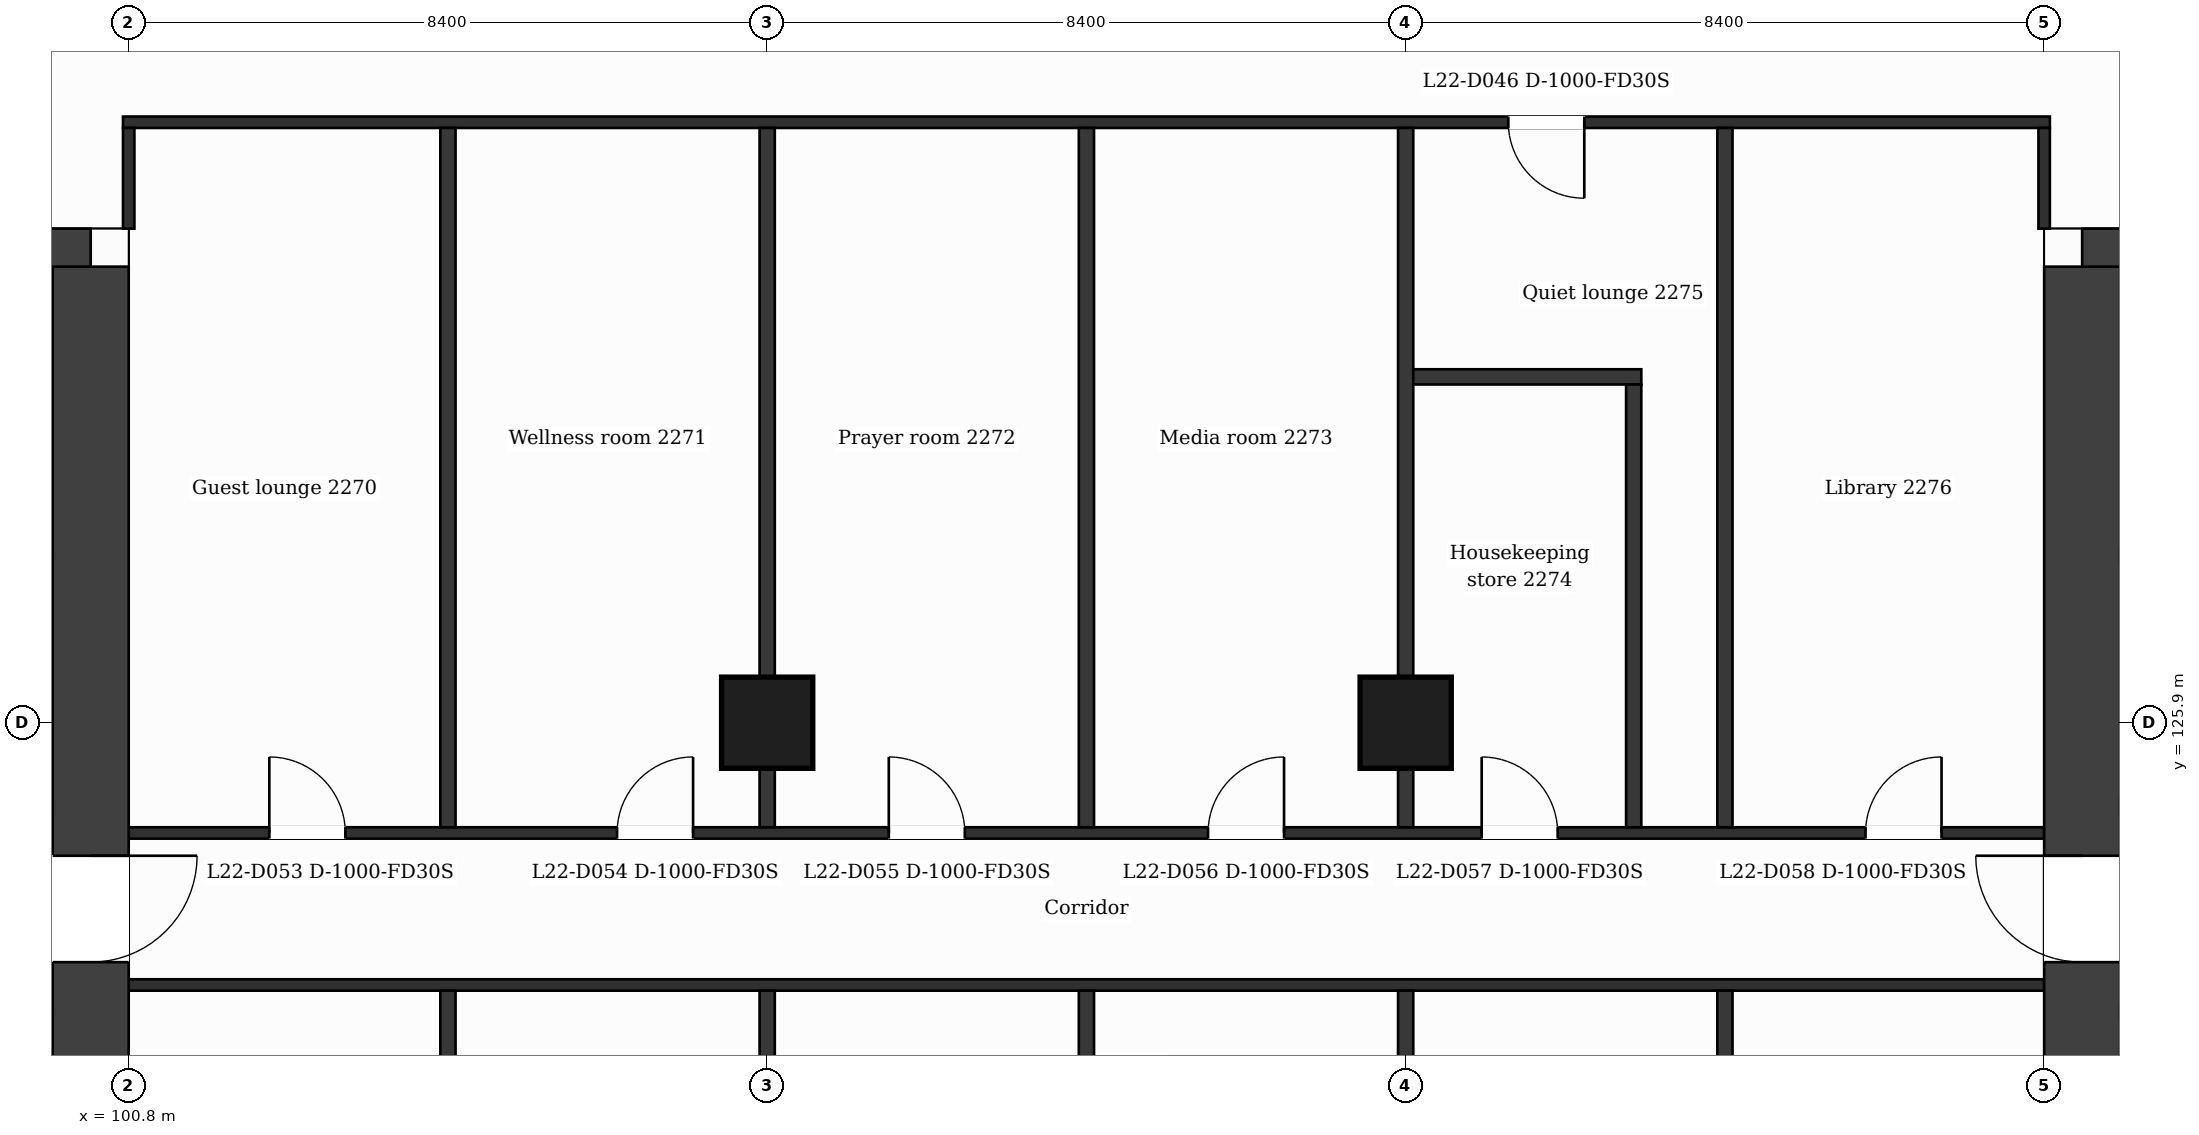
"""IFC4 building model, lengths in metres.
Left out: names, types, materials, properties, quantities, classifications, styles, units other than length and angle.
Written with IfcOpenShell. Run it as: python <this file> out.ifc"""

import sys

from ifc_helpers import new_model, si_unit, direction, frame, frame_2d, origin, origin_2d, place, context, subcontext, project, spatial, rectangle, extrude, element, fill, save


model = new_model("IFC4")
c1 = context("Model", 3, precision=1e-05, world=origin(), true_north=direction((0.0, 1.0)))
c2 = subcontext(c1, "Body", "Model", "MODEL_VIEW")
j1 = project(units=[si_unit("LENGTHUNIT", "METRE"), si_unit("PLANEANGLEUNIT", "RADIAN")], contexts=[c1])
p1 = place(None, origin())
s1 = spatial("IfcSite", under=j1, at=p1, CompositionType="ELEMENT")
p2 = place(p1, origin())
s2 = spatial("IfcBuilding", under=s1, at=p2, CompositionType="ELEMENT")
p3 = place(p2, frame((0.0, 0.0, 98.4)))
s3 = spatial("IfcBuildingStorey", under=s2, at=p3, CompositionType="ELEMENT", Elevation=98.4)
p4 = place(p3, frame((89.068, 131.9, 0.0), z_axis=(0.0, 0.0, 1.0), x_axis=(1.0, 0.0, 0.0)))
e1 = element("IfcWall", 1, at=p4, inside=s3, PredefinedType="SHEAR", context=c2, shape_type="SweptSolid", body=[
    extrude(rectangle(XDim=11.232, YDim=1.0, at=frame_2d((5.616, 0.0))), origin(), (0.0, 0.0, 1.0), 3.7),
])
p5 = place(p4, frame((6.646, 0.0, 0.0)))
e2 = element("IfcOpeningElement", 2, at=p5, cuts=e1, PredefinedType="OPENING", context=c2, shape_type="SweptSolid", body=[
    extrude(rectangle(XDim=1.2, YDim=2.1, at=frame_2d((0.6, 1.05))), frame((0.0, 0.51, 0.0), z_axis=(0.0, -1.0, 0.0), x_axis=(1.0, 0.0, 0.0)), (0.0, 0.0, 1.0), 1.02),
])
p6 = place(p3, frame((100.3, 131.9, 0.0), z_axis=(0.0, 0.0, 1.0), x_axis=(0.0, -1.0, 0.0)))
e3 = element("IfcWall", 3, at=p6, inside=s3, PredefinedType="SHEAR", context=c2, shape_type="SweptSolid", body=[
    extrude(rectangle(XDim=21.0, YDim=1.0, at=frame_2d((10.5, 0.0))), origin(), (0.0, 0.0, 1.0), 3.7),
])
p7 = place(p6, frame((7.75, 0.0, 0.0)))
e4 = element("IfcOpeningElement", 4, at=p7, cuts=e3, PredefinedType="OPENING", context=c2, shape_type="SweptSolid", body=[
    extrude(rectangle(XDim=1.4, YDim=2.1, at=frame_2d((0.7, 1.05))), frame((0.0, 0.51, 0.0), z_axis=(0.0, -1.0, 0.0), x_axis=(1.0, 0.0, 0.0)), (0.0, 0.0, 1.0), 1.02),
])
p8 = place(p3, frame((126.5, 131.9, 0.0), z_axis=(0.0, 0.0, 1.0), x_axis=(1.0, 0.0, 0.0)))
e5 = element("IfcWall", 5, at=p8, inside=s3, PredefinedType="SHEAR", context=c2, shape_type="SweptSolid", body=[
    extrude(rectangle(XDim=11.232, YDim=1.0, at=frame_2d((5.616, 0.0))), origin(), (0.0, 0.0, 1.0), 3.7),
])
p9 = place(p8, frame((3.386, 0.0, 0.0)))
e6 = element("IfcOpeningElement", 6, at=p9, cuts=e5, PredefinedType="OPENING", context=c2, shape_type="SweptSolid", body=[
    extrude(rectangle(XDim=1.2, YDim=2.1, at=frame_2d((0.6, 1.05))), frame((0.0, 0.51, 0.0), z_axis=(0.0, -1.0, 0.0), x_axis=(1.0, 0.0, 0.0)), (0.0, 0.0, 1.0), 1.02),
])
p10 = place(p3, frame((126.5, 110.9, 0.0), z_axis=(0.0, 0.0, 1.0), x_axis=(0.0, 1.0, 0.0)))
e7 = element("IfcWall", 7, at=p10, inside=s3, PredefinedType="SHEAR", context=c2, shape_type="SweptSolid", body=[
    extrude(rectangle(XDim=21.0, YDim=1.0, at=frame_2d((10.5, 0.0))), origin(), (0.0, 0.0, 1.0), 3.7),
])
p11 = place(p10, frame((11.85, 0.0, 0.0)))
e8 = element("IfcOpeningElement", 8, at=p11, cuts=e7, PredefinedType="OPENING", context=c2, shape_type="SweptSolid", body=[
    extrude(rectangle(XDim=1.4, YDim=2.1, at=frame_2d((0.7, 1.05))), frame((0.0, 0.51, 0.0), z_axis=(0.0, -1.0, 0.0), x_axis=(1.0, 0.0, 0.0)), (0.0, 0.0, 1.0), 1.02),
])
for number, where, z_axis, x_axis in (
    (9, (109.2, 125.9, 0.0), (0.0, 0.0, 1.0), (1.0, 0.0, 0.0)),
    (10, (117.6, 125.9, 0.0), (0.0, 0.0, 1.0), (1.0, 0.0, 0.0)),
):
    element("IfcColumn", number, at=place(p3, frame(where, z_axis=z_axis, x_axis=x_axis)), inside=s3, PredefinedType="COLUMN", context=c2, shape_type="SweptSolid", body=[
        extrude(rectangle(XDim=1.2, YDim=1.2, at=origin_2d()), origin(), (0.0, 0.0, 1.0), 3.7),
    ])
p12 = place(p3, frame((95.227, 122.1, 0.0), z_axis=(0.0, 0.0, 1.0), x_axis=(1.0, 0.0, 0.0)))
e11 = element("IfcWall", 11, at=p12, inside=s3, PredefinedType="PARTITIONING", context=c2, shape_type="SweptSolid", body=[
    extrude(rectangle(XDim=4.573, YDim=0.2, at=frame_2d((2.287, 0.0))), origin(), (0.0, 0.0, 1.0), 3.38),
])
p13 = place(p12, frame((0.693, 0.0, 0.0)))
e12 = element("IfcOpeningElement", 12, at=p13, cuts=e11, PredefinedType="OPENING", context=c2, shape_type="SweptSolid", body=[
    extrude(rectangle(XDim=0.9, YDim=2.1, at=frame_2d((0.45, 1.05))), frame((0.0, 0.11, 0.0), z_axis=(0.0, -1.0, 0.0), x_axis=(1.0, 0.0, 0.0)), (0.0, 0.0, 1.0), 0.22),
])
p14 = place(p12, frame((2.98, 0.0, 0.0)))
e13 = element("IfcOpeningElement", 13, at=p14, cuts=e11, PredefinedType="OPENING", context=c2, shape_type="SweptSolid", body=[
    extrude(rectangle(XDim=0.9, YDim=2.1, at=frame_2d((0.45, 1.05))), frame((0.0, 0.11, 0.0), z_axis=(0.0, -1.0, 0.0), x_axis=(1.0, 0.0, 0.0)), (0.0, 0.0, 1.0), 0.22),
])
p15 = place(p3, frame((100.8, 122.45, 0.0), z_axis=(0.0, 0.0, 1.0), x_axis=(1.0, 0.0, 0.0)))
e14 = element("IfcWall", 14, at=p15, inside=s3, PredefinedType="PARTITIONING", context=c2, shape_type="SweptSolid", body=[
    extrude(rectangle(XDim=25.2, YDim=0.15, at=frame_2d((12.6, 0.0))), origin(), (0.0, 0.0, 1.0), 3.38),
])
p16 = place(p3, frame((100.8, 124.45, 0.0), z_axis=(0.0, 0.0, 1.0), x_axis=(1.0, 0.0, 0.0)))
e15 = element("IfcWall", 15, at=p16, inside=s3, PredefinedType="PARTITIONING", context=c2, shape_type="SweptSolid", body=[
    extrude(rectangle(XDim=25.2, YDim=0.15, at=frame_2d((12.6, 0.0))), origin(), (0.0, 0.0, 1.0), 3.38),
])
p17 = place(p16, frame((1.85, 0.0, 0.0)))
e16 = element("IfcOpeningElement", 16, at=p17, cuts=e15, PredefinedType="OPENING", context=c2, shape_type="SweptSolid", body=[
    extrude(rectangle(XDim=1.0, YDim=2.1, at=frame_2d((0.5, 1.05))), frame((0.0, 0.085, 0.0), z_axis=(0.0, -1.0, 0.0), x_axis=(1.0, 0.0, 0.0)), (0.0, 0.0, 1.0), 0.17),
])
p18 = place(p16, frame((6.425, 0.0, 0.0)))
e17 = element("IfcOpeningElement", 17, at=p18, cuts=e15, PredefinedType="OPENING", context=c2, shape_type="SweptSolid", body=[
    extrude(rectangle(XDim=1.0, YDim=2.1, at=frame_2d((0.5, 1.05))), frame((0.0, 0.085, 0.0), z_axis=(0.0, -1.0, 0.0), x_axis=(1.0, 0.0, 0.0)), (0.0, 0.0, 1.0), 0.17),
])
p19 = place(p16, frame((10.0, 0.0, 0.0)))
e18 = element("IfcOpeningElement", 18, at=p19, cuts=e15, PredefinedType="OPENING", context=c2, shape_type="SweptSolid", body=[
    extrude(rectangle(XDim=1.0, YDim=2.1, at=frame_2d((0.5, 1.05))), frame((0.0, 0.085, 0.0), z_axis=(0.0, -1.0, 0.0), x_axis=(1.0, 0.0, 0.0)), (0.0, 0.0, 1.0), 0.17),
])
p20 = place(p16, frame((14.2, 0.0, 0.0)))
e19 = element("IfcOpeningElement", 19, at=p20, cuts=e15, PredefinedType="OPENING", context=c2, shape_type="SweptSolid", body=[
    extrude(rectangle(XDim=1.0, YDim=2.1, at=frame_2d((0.5, 1.05))), frame((0.0, 0.085, 0.0), z_axis=(0.0, -1.0, 0.0), x_axis=(1.0, 0.0, 0.0)), (0.0, 0.0, 1.0), 0.17),
])
p21 = place(p16, frame((17.8, 0.0, 0.0)))
e20 = element("IfcOpeningElement", 20, at=p21, cuts=e15, PredefinedType="OPENING", context=c2, shape_type="SweptSolid", body=[
    extrude(rectangle(XDim=1.0, YDim=2.1, at=frame_2d((0.5, 1.05))), frame((0.0, 0.085, 0.0), z_axis=(0.0, -1.0, 0.0), x_axis=(1.0, 0.0, 0.0)), (0.0, 0.0, 1.0), 0.17),
])
p22 = place(p16, frame((22.85, 0.0, 0.0)))
e21 = element("IfcOpeningElement", 21, at=p22, cuts=e15, PredefinedType="OPENING", context=c2, shape_type="SweptSolid", body=[
    extrude(rectangle(XDim=1.0, YDim=2.1, at=frame_2d((0.5, 1.05))), frame((0.0, 0.085, 0.0), z_axis=(0.0, -1.0, 0.0), x_axis=(1.0, 0.0, 0.0)), (0.0, 0.0, 1.0), 0.17),
])
p23 = place(p3, frame((127.0, 124.8, 0.0), z_axis=(0.0, 0.0, 1.0), x_axis=(1.0, 0.0, 0.0)))
e22 = element("IfcWall", 22, at=p23, inside=s3, PredefinedType="PARTITIONING", context=c2, shape_type="SweptSolid", body=[
    extrude(rectangle(XDim=4.649, YDim=0.2, at=frame_2d((2.324, 0.0))), origin(), (0.0, 0.0, 1.0), 3.38),
])
p24 = place(p23, frame((0.743, 0.0, 0.0)))
e23 = element("IfcOpeningElement", 23, at=p24, cuts=e22, PredefinedType="OPENING", context=c2, shape_type="SweptSolid", body=[
    extrude(rectangle(XDim=1.1, YDim=2.1, at=frame_2d((0.55, 1.05))), frame((0.0, 0.11, 0.0), z_axis=(0.0, -1.0, 0.0), x_axis=(1.0, 0.0, 0.0)), (0.0, 0.0, 1.0), 0.22),
])
p25 = place(p3, frame((127.0, 128.1, 0.0), z_axis=(0.0, 0.0, 1.0), x_axis=(1.0, 0.0, 0.0)))
e24 = element("IfcWall", 24, at=p25, inside=s3, PredefinedType="PARTITIONING", context=c2, shape_type="SweptSolid", body=[
    extrude(rectangle(XDim=4.649, YDim=0.2, at=frame_2d((2.324, 0.0))), origin(), (0.0, 0.0, 1.0), 3.38),
])
p26 = place(p25, frame((2.805, 0.0, 0.0)))
e25 = element("IfcOpeningElement", 25, at=p26, cuts=e24, PredefinedType="OPENING", context=c2, shape_type="SweptSolid", body=[
    extrude(rectangle(XDim=1.1, YDim=2.1, at=frame_2d((0.55, 1.05))), frame((0.0, 0.11, 0.0), z_axis=(0.0, -1.0, 0.0), x_axis=(1.0, 0.0, 0.0)), (0.0, 0.0, 1.0), 0.22),
])
p27 = place(p3, frame((117.6, 130.45, 0.0), z_axis=(0.0, 0.0, 1.0), x_axis=(1.0, 0.0, 0.0)))
e26 = element("IfcWall", 26, at=p27, inside=s3, PredefinedType="PARTITIONING", context=c2, shape_type="SweptSolid", body=[
    extrude(rectangle(XDim=3.1, YDim=0.2, at=frame_2d((1.55, 0.0))), origin(), (0.0, 0.0, 1.0), 3.38),
])
p28 = place(p3, frame((100.725, 133.8, 0.0), z_axis=(0.0, 0.0, 1.0), x_axis=(1.0, 0.0, 0.0)))
e27 = element("IfcWall", 27, at=p28, inside=s3, PredefinedType="PARTITIONING", context=c2, shape_type="SweptSolid", body=[
    extrude(rectangle(XDim=25.35, YDim=0.15, at=frame_2d((12.675, 0.0))), origin(), (0.0, 0.0, 1.0), 3.38),
])
p29 = place(p28, frame((18.225, 0.0, 0.0)))
e28 = element("IfcOpeningElement", 28, at=p29, cuts=e27, PredefinedType="OPENING", context=c2, shape_type="SweptSolid", body=[
    extrude(rectangle(XDim=1.0, YDim=2.1, at=frame_2d((0.5, 1.05))), frame((0.0, 0.085, 0.0), z_axis=(0.0, -1.0, 0.0), x_axis=(1.0, 0.0, 0.0)), (0.0, 0.0, 1.0), 0.17),
])
p30 = place(p3, frame((100.8, 132.4, 0.0), z_axis=(0.0, 0.0, 1.0), x_axis=(0.0, 1.0, 0.0)))
e29 = element("IfcWall", 29, at=p30, inside=s3, PredefinedType="PARTITIONING", context=c2, shape_type="SweptSolid", body=[
    extrude(rectangle(XDim=1.325, YDim=0.15, at=frame_2d((0.663, 0.0))), origin(), (0.0, 0.0, 1.0), 3.38),
])
p31 = place(p3, frame((105.0, 109.075, 0.0), z_axis=(0.0, 0.0, 1.0), x_axis=(0.0, 1.0, 0.0)))
e30 = element("IfcWall", 30, at=p31, inside=s3, PredefinedType="PARTITIONING", context=c2, shape_type="SweptSolid", body=[
    extrude(rectangle(XDim=13.3, YDim=0.2, at=frame_2d((6.65, 0.0))), origin(), (0.0, 0.0, 1.0), 3.38),
])
p32 = place(p3, frame((105.0, 124.525, 0.0), z_axis=(0.0, 0.0, 1.0), x_axis=(0.0, 1.0, 0.0)))
e31 = element("IfcWall", 31, at=p32, inside=s3, PredefinedType="PARTITIONING", context=c2, shape_type="SweptSolid", body=[
    extrude(rectangle(XDim=9.2, YDim=0.2, at=frame_2d((4.6, 0.0))), origin(), (0.0, 0.0, 1.0), 3.38),
])
p33 = place(p3, frame((109.2, 109.075, 0.0), z_axis=(0.0, 0.0, 1.0), x_axis=(0.0, 1.0, 0.0)))
e32 = element("IfcWall", 32, at=p33, inside=s3, PredefinedType="PARTITIONING", context=c2, shape_type="SweptSolid", body=[
    extrude(rectangle(XDim=13.3, YDim=0.2, at=frame_2d((6.65, 0.0))), origin(), (0.0, 0.0, 1.0), 3.38),
])
p34 = place(p3, frame((109.2, 124.525, 0.0), z_axis=(0.0, 0.0, 1.0), x_axis=(0.0, 1.0, 0.0)))
e33 = element("IfcWall", 33, at=p34, inside=s3, PredefinedType="PARTITIONING", context=c2, shape_type="SweptSolid", body=[
    extrude(rectangle(XDim=9.2, YDim=0.2, at=frame_2d((4.6, 0.0))), origin(), (0.0, 0.0, 1.0), 3.38),
])
p35 = place(p3, frame((113.4, 109.075, 0.0), z_axis=(0.0, 0.0, 1.0), x_axis=(0.0, 1.0, 0.0)))
e34 = element("IfcWall", 34, at=p35, inside=s3, PredefinedType="PARTITIONING", context=c2, shape_type="SweptSolid", body=[
    extrude(rectangle(XDim=13.3, YDim=0.2, at=frame_2d((6.65, 0.0))), origin(), (0.0, 0.0, 1.0), 3.38),
])
p36 = place(p3, frame((113.4, 124.525, 0.0), z_axis=(0.0, 0.0, 1.0), x_axis=(0.0, 1.0, 0.0)))
e35 = element("IfcWall", 35, at=p36, inside=s3, PredefinedType="PARTITIONING", context=c2, shape_type="SweptSolid", body=[
    extrude(rectangle(XDim=9.2, YDim=0.2, at=frame_2d((4.6, 0.0))), origin(), (0.0, 0.0, 1.0), 3.38),
])
p37 = place(p3, frame((117.6, 109.075, 0.0), z_axis=(0.0, 0.0, 1.0), x_axis=(0.0, 1.0, 0.0)))
e36 = element("IfcWall", 36, at=p37, inside=s3, PredefinedType="PARTITIONING", context=c2, shape_type="SweptSolid", body=[
    extrude(rectangle(XDim=13.3, YDim=0.2, at=frame_2d((6.65, 0.0))), origin(), (0.0, 0.0, 1.0), 3.38),
])
p38 = place(p3, frame((117.6, 124.525, 0.0), z_axis=(0.0, 0.0, 1.0), x_axis=(0.0, 1.0, 0.0)))
e37 = element("IfcWall", 37, at=p38, inside=s3, PredefinedType="PARTITIONING", context=c2, shape_type="SweptSolid", body=[
    extrude(rectangle(XDim=9.2, YDim=0.2, at=frame_2d((4.6, 0.0))), origin(), (0.0, 0.0, 1.0), 3.38),
])
p39 = place(p3, frame((120.6, 124.525, 0.0), z_axis=(0.0, 0.0, 1.0), x_axis=(0.0, 1.0, 0.0)))
e38 = element("IfcWall", 38, at=p39, inside=s3, PredefinedType="PARTITIONING", context=c2, shape_type="SweptSolid", body=[
    extrude(rectangle(XDim=5.825, YDim=0.2, at=frame_2d((2.913, 0.0))), origin(), (0.0, 0.0, 1.0), 3.38),
])
p40 = place(p3, frame((121.8, 109.075, 0.0), z_axis=(0.0, 0.0, 1.0), x_axis=(0.0, 1.0, 0.0)))
e39 = element("IfcWall", 39, at=p40, inside=s3, PredefinedType="PARTITIONING", context=c2, shape_type="SweptSolid", body=[
    extrude(rectangle(XDim=13.3, YDim=0.2, at=frame_2d((6.65, 0.0))), origin(), (0.0, 0.0, 1.0), 3.38),
])
p41 = place(p3, frame((121.8, 124.525, 0.0), z_axis=(0.0, 0.0, 1.0), x_axis=(0.0, 1.0, 0.0)))
e40 = element("IfcWall", 40, at=p41, inside=s3, PredefinedType="PARTITIONING", context=c2, shape_type="SweptSolid", body=[
    extrude(rectangle(XDim=9.2, YDim=0.2, at=frame_2d((4.6, 0.0))), origin(), (0.0, 0.0, 1.0), 3.38),
])
p42 = place(p3, frame((126.0, 132.4, 0.0), z_axis=(0.0, 0.0, 1.0), x_axis=(0.0, 1.0, 0.0)))
e41 = element("IfcWall", 41, at=p42, inside=s3, PredefinedType="PARTITIONING", context=c2, shape_type="SweptSolid", body=[
    extrude(rectangle(XDim=1.325, YDim=0.15, at=frame_2d((0.663, 0.0))), origin(), (0.0, 0.0, 1.0), 3.38),
])
p43 = place(p29, origin())
e42 = element("IfcDoor", 42, at=p43, inside=s3, OperationType="SINGLE_SWING_RIGHT", PredefinedType="DOOR", context=c2, shape_type="SweptSolid", body=[
    extrude(rectangle(XDim=1.0, YDim=2.1, at=frame_2d((0.5, 1.05))), frame((0.0, 0.025, 0.0), z_axis=(0.0, -1.0, 0.0), x_axis=(1.0, 0.0, 0.0)), (0.0, 0.0, 1.0), 0.05),
])
fill(e28, e42)
p44 = place(p17, origin())
e43 = element("IfcDoor", 43, at=p44, inside=s3, OperationType="SINGLE_SWING_LEFT", PredefinedType="DOOR", context=c2, shape_type="SweptSolid", body=[
    extrude(rectangle(XDim=1.0, YDim=2.1, at=frame_2d((0.5, 1.05))), frame((0.0, 0.025, 0.0), z_axis=(0.0, -1.0, 0.0), x_axis=(1.0, 0.0, 0.0)), (0.0, 0.0, 1.0), 0.05),
])
fill(e16, e43)
p45 = place(p18, origin())
e44 = element("IfcDoor", 44, at=p45, inside=s3, OperationType="SINGLE_SWING_RIGHT", PredefinedType="DOOR", context=c2, shape_type="SweptSolid", body=[
    extrude(rectangle(XDim=1.0, YDim=2.1, at=frame_2d((0.5, 1.05))), frame((0.0, 0.025, 0.0), z_axis=(0.0, -1.0, 0.0), x_axis=(1.0, 0.0, 0.0)), (0.0, 0.0, 1.0), 0.05),
])
fill(e17, e44)
p46 = place(p19, origin())
e45 = element("IfcDoor", 45, at=p46, inside=s3, OperationType="SINGLE_SWING_LEFT", PredefinedType="DOOR", context=c2, shape_type="SweptSolid", body=[
    extrude(rectangle(XDim=1.0, YDim=2.1, at=frame_2d((0.5, 1.05))), frame((0.0, 0.025, 0.0), z_axis=(0.0, -1.0, 0.0), x_axis=(1.0, 0.0, 0.0)), (0.0, 0.0, 1.0), 0.05),
])
fill(e18, e45)
p47 = place(p20, origin())
e46 = element("IfcDoor", 46, at=p47, inside=s3, OperationType="SINGLE_SWING_RIGHT", PredefinedType="DOOR", context=c2, shape_type="SweptSolid", body=[
    extrude(rectangle(XDim=1.0, YDim=2.1, at=frame_2d((0.5, 1.05))), frame((0.0, 0.025, 0.0), z_axis=(0.0, -1.0, 0.0), x_axis=(1.0, 0.0, 0.0)), (0.0, 0.0, 1.0), 0.05),
])
fill(e19, e46)
p48 = place(p21, origin())
e47 = element("IfcDoor", 47, at=p48, inside=s3, OperationType="SINGLE_SWING_LEFT", PredefinedType="DOOR", context=c2, shape_type="SweptSolid", body=[
    extrude(rectangle(XDim=1.0, YDim=2.1, at=frame_2d((0.5, 1.05))), frame((0.0, 0.025, 0.0), z_axis=(0.0, -1.0, 0.0), x_axis=(1.0, 0.0, 0.0)), (0.0, 0.0, 1.0), 0.05),
])
fill(e20, e47)
p49 = place(p22, origin())
e48 = element("IfcDoor", 48, at=p49, inside=s3, OperationType="SINGLE_SWING_RIGHT", PredefinedType="DOOR", context=c2, shape_type="SweptSolid", body=[
    extrude(rectangle(XDim=1.0, YDim=2.1, at=frame_2d((0.5, 1.05))), frame((0.0, 0.025, 0.0), z_axis=(0.0, -1.0, 0.0), x_axis=(1.0, 0.0, 0.0)), (0.0, 0.0, 1.0), 0.05),
])
fill(e21, e48)
p50 = place(p7, origin())
e49 = element("IfcDoor", 49, at=p50, inside=s3, OperationType="SINGLE_SWING_LEFT", PredefinedType="DOOR", context=c2, shape_type="SweptSolid", body=[
    extrude(rectangle(XDim=1.4, YDim=2.1, at=frame_2d((0.7, 1.05))), frame((0.0, 0.025, 0.0), z_axis=(0.0, -1.0, 0.0), x_axis=(1.0, 0.0, 0.0)), (0.0, 0.0, 1.0), 0.05),
])
fill(e4, e49)
p51 = place(p11, origin())
e50 = element("IfcDoor", 50, at=p51, inside=s3, OperationType="SINGLE_SWING_RIGHT", PredefinedType="DOOR", context=c2, shape_type="SweptSolid", body=[
    extrude(rectangle(XDim=1.4, YDim=2.1, at=frame_2d((0.7, 1.05))), frame((0.0, 0.025, 0.0), z_axis=(0.0, -1.0, 0.0), x_axis=(1.0, 0.0, 0.0)), (0.0, 0.0, 1.0), 0.05),
])
fill(e8, e50)
save(model, sys.argv[1])
